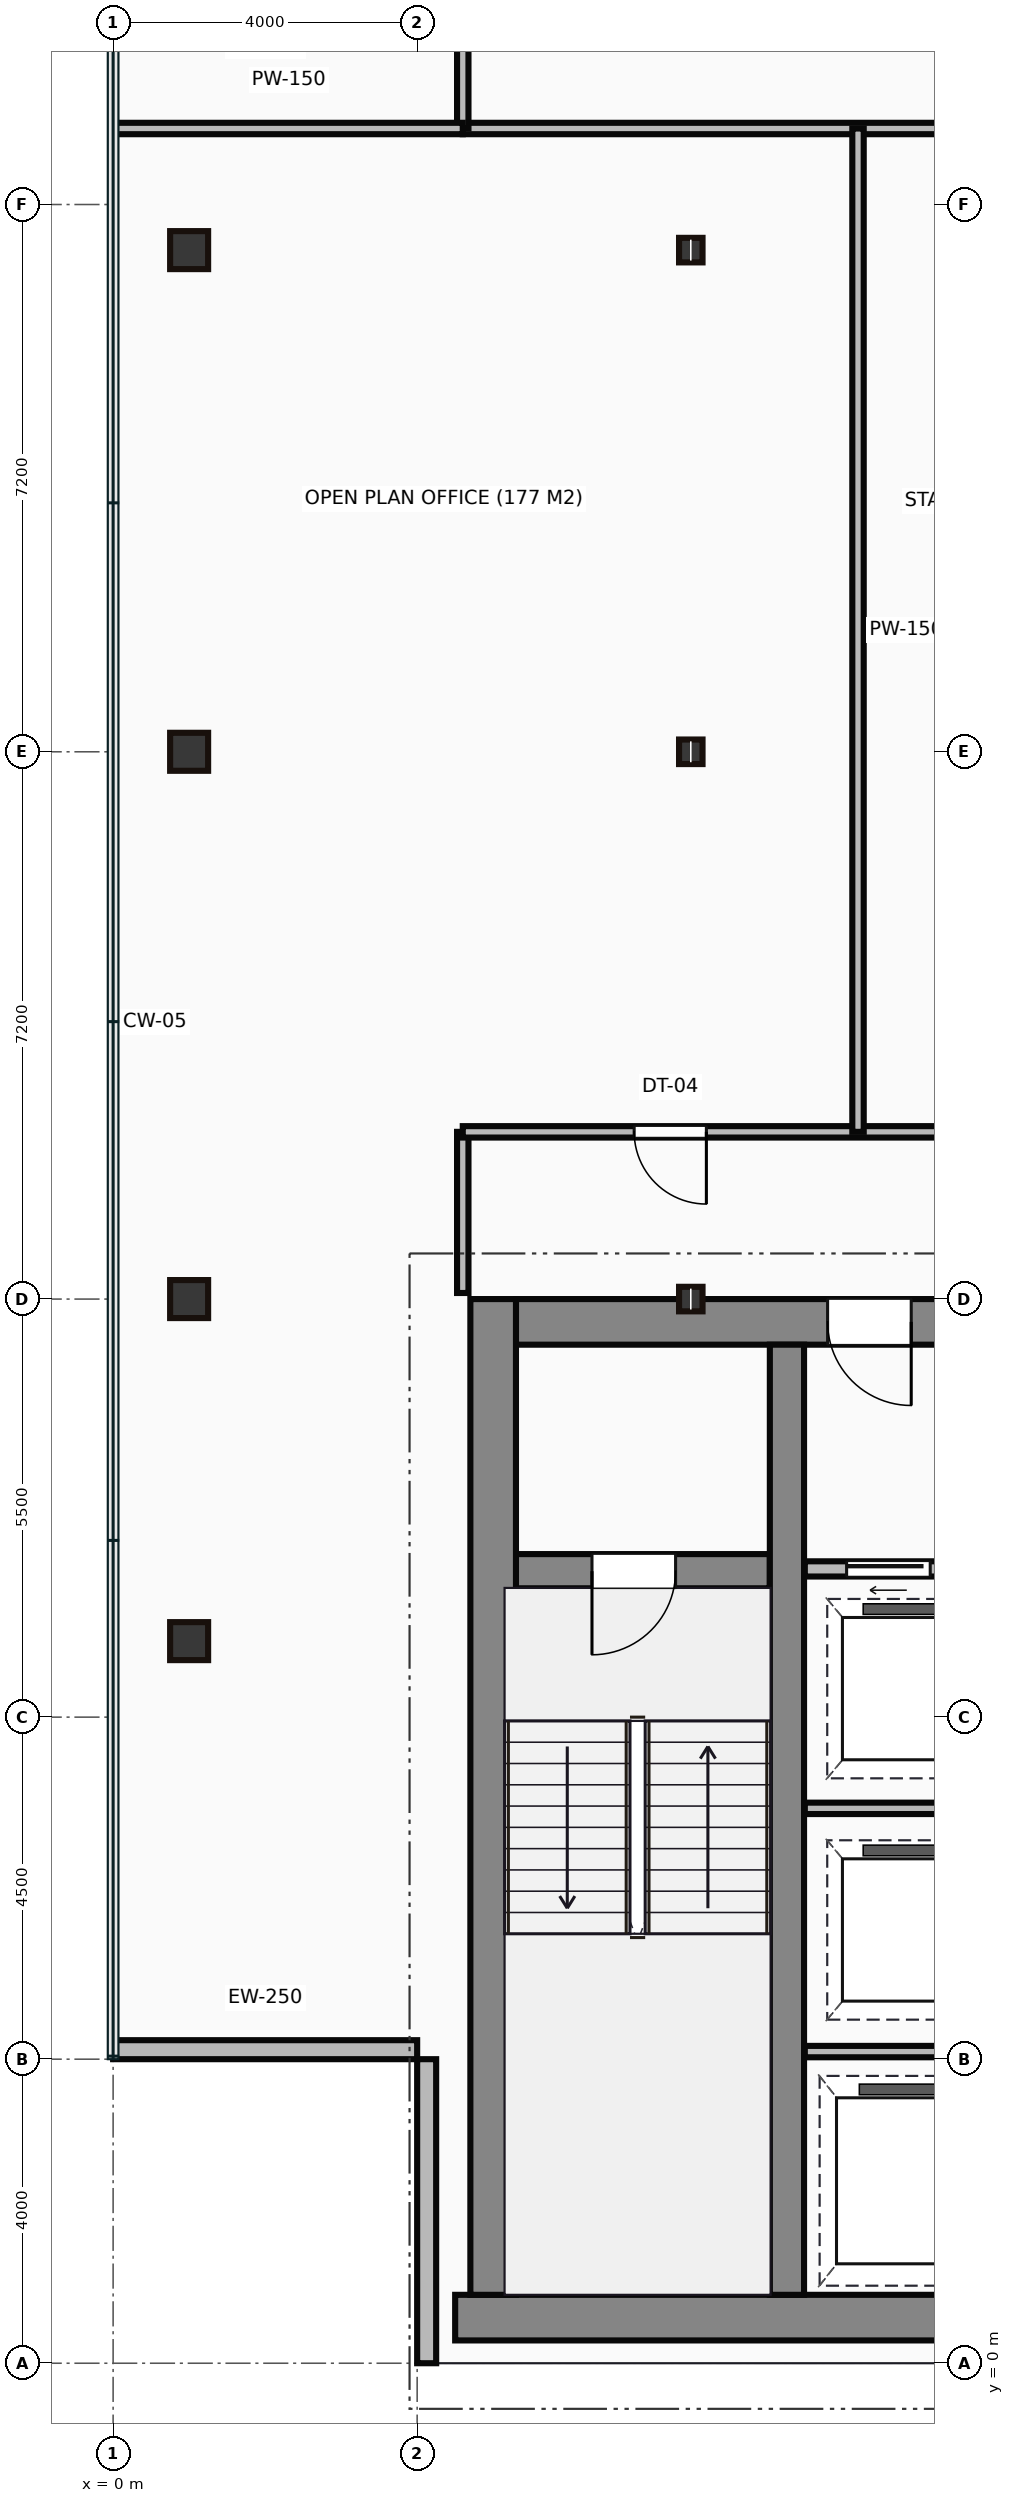
"""IFC4 building model, lengths in metres.
Left out: names, types, materials, properties, quantities, classifications, styles, units other than length and angle.
Written with IfcOpenShell. Run it as: python <this file> out.ifc"""

import sys

from ifc_helpers import new_model, si_unit, direction, frame, frame_2d, origin, origin_2d, place, context, subcontext, project, spatial, rectangle, hollow_rectangle, i_section, extrude, source, transform, mapped, element, fill, save


model = new_model("IFC4")
c1 = context("Model", 3, precision=1e-05, world=origin(), true_north=direction((0.0, 1.0)))
c2 = subcontext(c1, "Body", "Model", "MODEL_VIEW")
j1 = project(units=[si_unit("LENGTHUNIT", "METRE"), si_unit("PLANEANGLEUNIT", "RADIAN")], contexts=[c1])
p1 = place(None, origin())
s1 = spatial("IfcSite", under=j1, at=p1, CompositionType="ELEMENT")
p2 = place(p1, origin())
s2 = spatial("IfcBuilding", under=s1, at=p2, CompositionType="ELEMENT")
p3 = place(p2, frame((0.0, 0.0, 225.1)))
s3 = spatial("IfcBuildingStorey", under=s2, at=p3, CompositionType="ELEMENT", Elevation=225.1)
m1 = source(origin(), c2, "Body", "SweptSolid", [
    extrude(rectangle(XDim=29.5, YDim=0.6, at=frame_2d((14.75, 0.0))), origin(), (0.0, 0.0, 1.0), 3.65),
])
p4 = place(p3, frame((4.5, 0.6, 0.0), z_axis=(0.0, 0.0, 1.0), x_axis=(1.0, 0.0, 0.0)))
e1 = element("IfcWall", 1, at=p4, inside=s3, PredefinedType="SHEAR", context=c2, shape_type="MappedRepresentation", body=[
    mapped(m1, transform((0.0, 0.0, 0.0))),
])
m2 = source(origin(), c2, "Body", "SweptSolid", [
    extrude(rectangle(XDim=13.1, YDim=0.6, at=frame_2d((6.55, 0.0))), origin(), (0.0, 0.0, 1.0), 3.65),
])
p5 = place(p3, frame((5.0, 0.9, 0.0), z_axis=(0.0, 0.0, 1.0), x_axis=(0.0, 1.0, 0.0)))
e2 = element("IfcWall", 2, at=p5, inside=s3, PredefinedType="SHEAR", context=c2, shape_type="MappedRepresentation", body=[
    mapped(m2, transform((0.0, 0.0, 0.0))),
])
m3 = source(origin(), c2, "Body", "SweptSolid", [
    extrude(rectangle(XDim=9.1, YDim=0.6, at=frame_2d((4.55, 0.0))), origin(), (0.0, 0.0, 1.0), 3.65),
])
p6 = place(p3, frame((5.3, 13.7, 0.0), z_axis=(0.0, 0.0, 1.0), x_axis=(1.0, 0.0, 0.0)))
e3 = element("IfcWall", 3, at=p6, inside=s3, PredefinedType="SHEAR", context=c2, shape_type="MappedRepresentation", body=[
    mapped(m3, transform((0.0, 0.0, 0.0))),
])
p7 = place(p6, frame((4.1, 0.0, 0.0)))
e4 = element("IfcOpeningElement", 4, at=p7, cuts=e3, PredefinedType="OPENING", context=c2, shape_type="SweptSolid", body=[
    extrude(rectangle(XDim=1.1, YDim=2.15, at=frame_2d((0.55, 1.075))), frame((0.0, 0.31, 0.0), z_axis=(0.0, -1.0, 0.0), x_axis=(1.0, 0.0, 0.0)), (0.0, 0.0, 1.0), 0.62),
])
m4 = source(origin(), c2, "Body", "SweptSolid", [
    extrude(rectangle(XDim=12.5, YDim=0.45, at=frame_2d((6.25, 0.0))), origin(), (0.0, 0.0, 1.0), 3.65),
])
p8 = place(p3, frame((8.865, 0.9, 0.0), z_axis=(0.0, 0.0, 1.0), x_axis=(0.0, 1.0, 0.0)))
e5 = element("IfcWall", 5, at=p8, inside=s3, PredefinedType="SHEAR", context=c2, shape_type="MappedRepresentation", body=[
    mapped(m4, transform((0.0, 0.0, 0.0))),
])
m5 = source(origin(), c2, "Body", "SweptSolid", [
    extrude(rectangle(XDim=3.39, YDim=0.45, at=frame_2d((1.695, 0.0))), origin(), (0.0, 0.0, 1.0), 3.65),
])
p9 = place(p3, frame((5.25, 10.42, 0.0), z_axis=(0.0, 0.0, 1.0), x_axis=(1.0, 0.0, 0.0)))
e6 = element("IfcWall", 6, at=p9, inside=s3, PredefinedType="SHEAR", context=c2, shape_type="MappedRepresentation", body=[
    mapped(m5, transform((0.0, 0.0, 0.0))),
])
p10 = place(p9, frame((1.05, 0.0, 0.0)))
e7 = element("IfcOpeningElement", 7, at=p10, cuts=e6, PredefinedType="OPENING", context=c2, shape_type="SweptSolid", body=[
    extrude(rectangle(XDim=1.1, YDim=2.15, at=frame_2d((0.55, 1.075))), frame((0.0, 0.235, 0.0), z_axis=(0.0, -1.0, 0.0), x_axis=(1.0, 0.0, 0.0)), (0.0, 0.0, 1.0), 0.47),
])
m6 = source(origin(), c2, "Body", "SweptSolid", [
    extrude(hollow_rectangle(XDim=0.5, YDim=0.5, WallThickness=0.022, at=origin_2d()), origin(), (0.0, 0.0, 1.0), 3.65),
])
for number, where, z_axis, x_axis in (
    (8, (1.0, 9.5, 0.0), (0.0, 0.0, 1.0), (1.0, 0.0, 0.0)),
    (9, (1.0, 14.0, 0.0), (0.0, 0.0, 1.0), (1.0, 0.0, 0.0)),
    (10, (1.0, 21.2, 0.0), (0.0, 0.0, 1.0), (1.0, 0.0, 0.0)),
    (11, (1.0, 27.8, 0.0), (0.0, 0.0, 1.0), (1.0, 0.0, 0.0)),
):
    element("IfcColumn", number, at=place(p3, frame(where, z_axis=z_axis, x_axis=x_axis)), inside=s3, PredefinedType="COLUMN", context=c2, shape_type="MappedRepresentation", body=[
        mapped(m6, transform((0.0, 0.0, 0.0))),
    ])
m7 = source(origin(), c2, "Body", "SweptSolid", [
    extrude(i_section(OverallWidth=0.309, OverallDepth=0.323, WebThickness=0.014, FlangeThickness=0.023, at=origin_2d()), origin(), (0.0, 0.0, 1.0), 3.65),
])
for number, where, z_axis, x_axis in (
    (12, (7.6, 14.0, 0.0), (0.0, 0.0, 1.0), (1.0, 0.0, 0.0)),
    (13, (7.6, 21.2, 0.0), (0.0, 0.0, 1.0), (1.0, 0.0, 0.0)),
    (14, (7.6, 27.8, 0.0), (0.0, 0.0, 1.0), (1.0, 0.0, 0.0)),
):
    element("IfcColumn", number, at=place(p3, frame(where, z_axis=z_axis, x_axis=x_axis)), inside=s3, PredefinedType="COLUMN", context=c2, shape_type="MappedRepresentation", body=[
        mapped(m7, transform((0.0, 0.0, 0.0))),
    ])
m8 = source(origin(), c2, "Body", "SweptSolid", [
    extrude(rectangle(XDim=4.0, YDim=0.25, at=frame_2d((2.0, 0.0))), origin(), (0.0, 0.0, 1.0), 3.4),
])
for number, where, z_axis, x_axis in (
    (15, (0.0, 4.125, 0.0), (0.0, 0.0, 1.0), (1.0, 0.0, 0.0)),
    (16, (4.125, 4.0, 0.0), (0.0, 0.0, 1.0), (0.0, -1.0, 0.0)),
):
    element("IfcWall", number, at=place(p3, frame(where, z_axis=z_axis, x_axis=x_axis)), inside=s3, PredefinedType="STANDARD", context=c2, shape_type="MappedRepresentation", body=[
        mapped(m8, transform((0.0, 0.0, 0.0))),
    ])
m9 = source(origin(), c2, "Body", "SweptSolid", [
    extrude(rectangle(XDim=2.35, YDim=0.2, at=frame_2d((1.175, 0.0))), origin(), (0.0, 0.0, 1.0), 3.4),
])
p11 = place(p3, frame((9.1, 10.45, 0.0), z_axis=(0.0, 0.0, 1.0), x_axis=(1.0, 0.0, 0.0)))
e17 = element("IfcWall", 17, at=p11, inside=s3, PredefinedType="PARTITIONING", context=c2, shape_type="MappedRepresentation", body=[
    mapped(m9, transform((0.0, 0.0, 0.0))),
])
p12 = place(p11, frame((0.55, 0.0, 0.0)))
e18 = element("IfcOpeningElement", 18, at=p12, cuts=e17, PredefinedType="OPENING", context=c2, shape_type="SweptSolid", body=[
    extrude(rectangle(XDim=1.1, YDim=2.15, at=frame_2d((0.55, 1.075))), frame((0.0, 0.11, 0.0), z_axis=(0.0, -1.0, 0.0), x_axis=(1.0, 0.0, 0.0)), (0.0, 0.0, 1.0), 0.22),
])
m10 = source(origin(), c2, "Body", "SweptSolid", [
    extrude(rectangle(XDim=2.4, YDim=0.15, at=frame_2d((1.2, 0.0))), origin(), (0.0, 0.0, 1.0), 3.4),
])
for number, where, z_axis, x_axis in (
    (19, (9.1, 4.1, 0.0), (0.0, 0.0, 1.0), (1.0, 0.0, 0.0)),
    (20, (9.1, 7.3, 0.0), (0.0, 0.0, 1.0), (1.0, 0.0, 0.0)),
):
    element("IfcWall", number, at=place(p3, frame(where, z_axis=z_axis, x_axis=x_axis)), inside=s3, PredefinedType="PARTITIONING", context=c2, shape_type="MappedRepresentation", body=[
        mapped(m10, transform((0.0, 0.0, 0.0))),
    ])
m11 = source(origin(), c2, "Body", "SweptSolid", [
    extrude(rectangle(XDim=2.12, YDim=0.15, at=frame_2d((1.06, 0.0))), origin(), (0.0, 0.0, 1.0), 3.4),
])
p13 = place(p3, frame((4.6, 14.08, 0.0), z_axis=(0.0, 0.0, 1.0), x_axis=(0.0, 1.0, 0.0)))
e21 = element("IfcWall", 21, at=p13, inside=s3, PredefinedType="PARTITIONING", context=c2, shape_type="MappedRepresentation", body=[
    mapped(m11, transform((0.0, 0.0, 0.0))),
])
m12 = source(origin(), c2, "Body", "SweptSolid", [
    extrude(rectangle(XDim=22.2, YDim=0.15, at=frame_2d((11.1, 0.0))), origin(), (0.0, 0.0, 1.0), 3.4),
])
p14 = place(p3, frame((4.6, 16.2, 0.0), z_axis=(0.0, 0.0, 1.0), x_axis=(1.0, 0.0, 0.0)))
e22 = element("IfcWall", 22, at=p14, inside=s3, PredefinedType="PARTITIONING", context=c2, shape_type="MappedRepresentation", body=[
    mapped(m12, transform((0.0, 0.0, 0.0))),
])
p15 = place(p14, frame((2.255, 0.0, 0.0)))
e23 = element("IfcOpeningElement", 23, at=p15, cuts=e22, PredefinedType="OPENING", context=c2, shape_type="SweptSolid", body=[
    extrude(rectangle(XDim=0.95, YDim=2.15, at=frame_2d((0.475, 1.075))), frame((0.0, 0.085, 0.0), z_axis=(0.0, -1.0, 0.0), x_axis=(1.0, 0.0, 0.0)), (0.0, 0.0, 1.0), 0.17),
])
p16 = place(p14, frame((9.025, 0.0, 0.0)))
e24 = element("IfcOpeningElement", 24, at=p16, cuts=e22, PredefinedType="OPENING", context=c2, shape_type="SweptSolid", body=[
    extrude(rectangle(XDim=0.95, YDim=2.15, at=frame_2d((0.475, 1.075))), frame((0.0, 0.085, 0.0), z_axis=(0.0, -1.0, 0.0), x_axis=(1.0, 0.0, 0.0)), (0.0, 0.0, 1.0), 0.17),
])
p17 = place(p3, frame((26.8, 29.4, 0.0), z_axis=(0.0, 0.0, 1.0), x_axis=(-1.0, 0.0, 0.0)))
e25 = element("IfcWall", 25, at=p17, inside=s3, PredefinedType="PARTITIONING", context=c2, shape_type="MappedRepresentation", body=[
    mapped(m12, transform((0.0, 0.0, 0.0))),
])
m13 = source(origin(), c2, "Body", "SweptSolid", [
    extrude(rectangle(XDim=2.05, YDim=0.15, at=frame_2d((1.025, 0.0))), origin(), (0.0, 0.0, 1.0), 3.4),
])
p18 = place(p3, frame((4.6, 29.4, 0.0), z_axis=(0.0, 0.0, 1.0), x_axis=(0.0, 1.0, 0.0)))
e26 = element("IfcWall", 26, at=p18, inside=s3, PredefinedType="PARTITIONING", context=c2, shape_type="MappedRepresentation", body=[
    mapped(m13, transform((0.0, 0.0, 0.0))),
])
m14 = source(origin(), c2, "Body", "SweptSolid", [
    extrude(rectangle(XDim=4.58, YDim=0.15, at=frame_2d((2.29, 0.0))), origin(), (0.0, 0.0, 1.0), 3.4),
])
p19 = place(p3, frame((0.02, 29.4, 0.0), z_axis=(0.0, 0.0, 1.0), x_axis=(1.0, 0.0, 0.0)))
e27 = element("IfcWall", 27, at=p19, inside=s3, PredefinedType="PARTITIONING", context=c2, shape_type="MappedRepresentation", body=[
    mapped(m14, transform((0.0, 0.0, 0.0))),
])
m15 = source(origin(), c2, "Body", "SweptSolid", [
    extrude(rectangle(XDim=13.2, YDim=0.15, at=frame_2d((6.6, 0.0))), origin(), (0.0, 0.0, 1.0), 3.4),
])
p20 = place(p3, frame((9.8, 29.4, 0.0), z_axis=(0.0, 0.0, 1.0), x_axis=(0.0, -1.0, 0.0)))
e28 = element("IfcWall", 28, at=p20, inside=s3, PredefinedType="PARTITIONING", context=c2, shape_type="MappedRepresentation", body=[
    mapped(m15, transform((0.0, 0.0, 0.0))),
])
m16 = source(origin(), c2, "Body", "SweptSolid", [
    extrude(rectangle(XDim=1.1, YDim=2.15, at=frame_2d((0.55, 1.075))), frame((0.0, 0.025, 0.0), z_axis=(0.0, -1.0, 0.0), x_axis=(1.0, 0.0, 0.0)), (0.0, 0.0, 1.0), 0.05),
])
p21 = place(p10, frame((1.1, 0.0, 0.0), z_axis=(0.0, 0.0, 1.0), x_axis=(-1.0, 0.0, 0.0)))
e29 = element("IfcDoor", 29, at=p21, inside=s3, OperationType="SINGLE_SWING_LEFT", PredefinedType="DOOR", context=c2, shape_type="MappedRepresentation", body=[
    mapped(m16, transform((0.0, 0.0, 0.0))),
])
fill(e7, e29)
p22 = place(p7, origin())
e30 = element("IfcDoor", 30, at=p22, inside=s3, OperationType="SINGLE_SWING_RIGHT", PredefinedType="DOOR", context=c2, shape_type="MappedRepresentation", body=[
    mapped(m16, transform((0.0, 0.0, 0.0))),
])
fill(e4, e30)
p23 = place(p12, origin())
e31 = element("IfcDoor", 31, at=p23, inside=s3, OperationType="SLIDING_TO_LEFT", PredefinedType="DOOR", context=c2, shape_type="MappedRepresentation", body=[
    mapped(m16, transform((0.0, 0.0, 0.0))),
])
fill(e18, e31)
m17 = source(origin(), c2, "Body", "SweptSolid", [
    extrude(rectangle(XDim=0.95, YDim=2.15, at=frame_2d((0.475, 1.075))), frame((0.0, 0.025, 0.0), z_axis=(0.0, -1.0, 0.0), x_axis=(1.0, 0.0, 0.0)), (0.0, 0.0, 1.0), 0.05),
])
p24 = place(p15, origin())
e32 = element("IfcDoor", 32, at=p24, inside=s3, OperationType="SINGLE_SWING_RIGHT", PredefinedType="DOOR", context=c2, shape_type="MappedRepresentation", body=[
    mapped(m17, transform((0.0, 0.0, 0.0))),
])
fill(e23, e32)
save(model, sys.argv[1])
